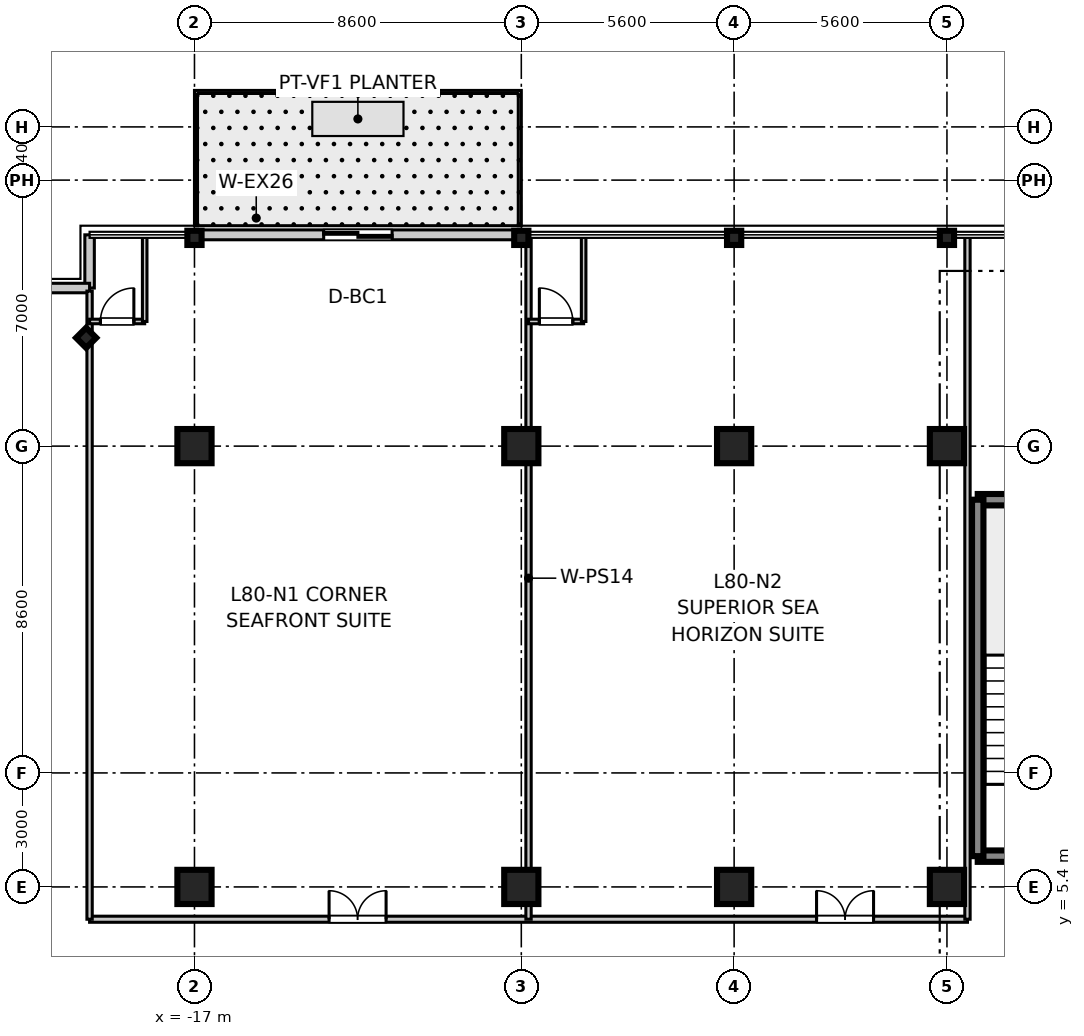
"""IFC4 building model, lengths in metres.
Left out: names, types, materials, properties, quantities, classifications, styles, units other than length and angle.
Written with IfcOpenShell. Run it as: python <this file> out.ifc"""

import sys

from ifc_helpers import new_model, si_unit, direction, frame, frame_2d, origin, origin_2d, place, context, subcontext, project, spatial, rectangle, i_section, extrude, source, transform, mapped, element, fill, save


model = new_model("IFC4")
c1 = context("Model", 3, precision=1e-05, world=origin(), true_north=direction((0.0, 1.0)))
c2 = subcontext(c1, "Body", "Model", "MODEL_VIEW")
j1 = project(units=[si_unit("LENGTHUNIT", "METRE"), si_unit("PLANEANGLEUNIT", "RADIAN")], contexts=[c1])
p1 = place(None, origin())
s1 = spatial("IfcSite", under=j1, at=p1, CompositionType="ELEMENT")
p2 = place(p1, origin())
s2 = spatial("IfcBuilding", under=s1, at=p2, CompositionType="ELEMENT")
p3 = place(p2, frame((0.0, 0.0, 311.9)))
s3 = spatial("IfcBuildingStorey", under=s2, at=p3, CompositionType="ELEMENT", Elevation=311.9)
m1 = source(origin(), c2, "Body", "SweptSolid", [
    extrude(rectangle(XDim=0.9, YDim=0.9, at=origin_2d()), origin(), (0.0, 0.0, 1.0), 3.805),
])
for number, where, z_axis, x_axis in (
    (1, (-17.0, 5.4, 0.0), (0.0, 0.0, 1.0), (1.0, 0.0, 0.0)),
    (2, (-17.0, 17.0, 0.0), (0.0, 0.0, 1.0), (1.0, 0.0, 0.0)),
    (3, (-8.4, 5.4, 0.0), (0.0, 0.0, 1.0), (1.0, 0.0, 0.0)),
    (4, (-8.4, 17.0, 0.0), (0.0, 0.0, 1.0), (1.0, 0.0, 0.0)),
    (5, (-2.8, 5.4, 0.0), (0.0, 0.0, 1.0), (1.0, 0.0, 0.0)),
    (6, (-2.8, 17.0, 0.0), (0.0, 0.0, 1.0), (1.0, 0.0, 0.0)),
    (7, (2.8, 5.4, 0.0), (0.0, 0.0, 1.0), (1.0, 0.0, 0.0)),
    (8, (2.8, 17.0, 0.0), (0.0, 0.0, 1.0), (1.0, 0.0, 0.0)),
):
    element("IfcColumn", number, at=place(p3, frame(where, z_axis=z_axis, x_axis=x_axis)), inside=s3, PredefinedType="COLUMN", context=c2, shape_type="MappedRepresentation", body=[
        mapped(m1, transform((0.0, 0.0, 0.0), scale=1.0)),
    ])
m2 = source(origin(), c2, "Body", "SweptSolid", [
    extrude(i_section(OverallWidth=0.374, OverallDepth=0.374, WebThickness=0.014, FlangeThickness=0.023, at=origin_2d()), origin(), (0.0, 0.0, 1.0), 3.805),
])
for number, where, z_axis, x_axis in (
    (9, (-17.0, 22.48, 0.0), (0.0, 0.0, 1.0), (0.0, 1.0, 0.0)),
    (10, (-8.4, 22.48, 0.0), (0.0, 0.0, 1.0), (0.0, 1.0, 0.0)),
    (11, (-2.8, 22.48, 0.0), (0.0, 0.0, 1.0), (0.0, 1.0, 0.0)),
    (12, (2.8, 22.48, 0.0), (0.0, 0.0, 1.0), (0.0, 1.0, 0.0)),
    (13, (-19.85, 19.85, 0.0), (0.0, 0.0, 1.0), (0.707, 0.707, 0.0)),
):
    element("IfcColumn", number, at=place(p3, frame(where, z_axis=z_axis, x_axis=x_axis)), inside=s3, PredefinedType="COLUMN", context=c2, shape_type="MappedRepresentation", body=[
        mapped(m2, transform((0.0, 0.0, 0.0), scale=1.0)),
    ])
m3 = source(origin(), c2, "Body", "SweptSolid", [
    extrude(rectangle(XDim=3.98, YDim=0.3, at=frame_2d((1.99, 0.0))), origin(), (0.0, 0.0, 1.0), 3.55),
])
for number, where, z_axis, x_axis in (
    (14, (3.61, 6.21, 0.0), (0.0, 0.0, 1.0), (1.0, 0.0, 0.0)),
    (15, (3.61, 15.59, 0.0), (0.0, 0.0, 1.0), (1.0, 0.0, 0.0)),
):
    element("IfcWall", number, at=place(p3, frame(where, z_axis=z_axis, x_axis=x_axis)), inside=s3, PredefinedType="SHEAR", context=c2, shape_type="MappedRepresentation", body=[
        mapped(m3, transform((0.0, 0.0, 0.0), scale=1.0)),
    ])
m4 = source(origin(), c2, "Body", "SweptSolid", [
    extrude(rectangle(XDim=9.38, YDim=0.3, at=frame_2d((4.69, 0.0))), origin(), (0.0, 0.0, 1.0), 3.55),
])
p4 = place(p3, frame((3.61, 6.21, 0.0), z_axis=(0.0, 0.0, 1.0), x_axis=(0.0, 1.0, 0.0)))
e16 = element("IfcWall", 16, at=p4, inside=s3, PredefinedType="SHEAR", context=c2, shape_type="MappedRepresentation", body=[
    mapped(m4, transform((0.0, 0.0, 0.0), scale=1.0)),
])
m5 = source(origin(), c2, "Body", "SweptSolid", [
    extrude(rectangle(XDim=1.4, YDim=0.25, at=frame_2d((0.7, 0.0))), origin(), (0.0, 0.0, 1.0), 3.55),
])
p5 = place(p3, frame((-19.76, 21.16, 0.0), z_axis=(0.0, 0.0, 1.0), x_axis=(0.0, 1.0, 0.0)))
e17 = element("IfcWall", 17, at=p5, inside=s3, PredefinedType="STANDARD", context=c2, shape_type="MappedRepresentation", body=[
    mapped(m5, transform((0.0, 0.0, 0.0), scale=1.0)),
])
m6 = source(origin(), c2, "Body", "SweptSolid", [
    extrude(rectangle(XDim=1.4, YDim=0.25, at=frame_2d((0.7, 0.0))), origin(), (0.0, 0.0, 1.0), 3.55),
])
p6 = place(p3, frame((-21.16, 21.16, 0.0), z_axis=(0.0, 0.0, 1.0), x_axis=(1.0, 0.0, 0.0)))
e18 = element("IfcWall", 18, at=p6, inside=s3, PredefinedType="STANDARD", context=c2, shape_type="MappedRepresentation", body=[
    mapped(m6, transform((0.0, 0.0, 0.0), scale=1.0)),
])
m7 = source(origin(), c2, "Body", "SweptSolid", [
    extrude(rectangle(XDim=8.6, YDim=0.26, at=frame_2d((4.3, 0.0))), origin(), (0.0, 0.0, 1.0), 3.03),
])
p7 = place(p3, frame((-17.0, 22.56, 0.0), z_axis=(0.0, 0.0, 1.0), x_axis=(1.0, 0.0, 0.0)))
e19 = element("IfcWall", 19, at=p7, inside=s3, PredefinedType="STANDARD", context=c2, shape_type="MappedRepresentation", body=[
    mapped(m7, transform((0.0, 0.0, 0.0), scale=1.0)),
])
p8 = place(p7, frame((3.4, 0.0, 0.0)))
e20 = element("IfcOpeningElement", 20, at=p8, cuts=e19, PredefinedType="OPENING", context=c2, shape_type="SweptSolid", body=[
    extrude(rectangle(XDim=1.8, YDim=2.25, at=frame_2d((0.9, 1.125))), frame((0.0, 0.14, 0.0), z_axis=(0.0, -1.0, 0.0), x_axis=(1.0, 0.0, 0.0)), (0.0, 0.0, 1.0), 0.28),
])
m8 = source(origin(), c2, "Body", "SweptSolid", [
    extrude(rectangle(XDim=23.1, YDim=0.16, at=frame_2d((11.55, 0.0))), origin(), (0.0, 0.0, 1.0), 2.89),
])
p9 = place(p3, frame((-19.76, 4.55, 0.0), z_axis=(0.0, 0.0, 1.0), x_axis=(1.0, 0.0, 0.0)))
e21 = element("IfcWall", 21, at=p9, inside=s3, PredefinedType="PARTITIONING", context=c2, shape_type="MappedRepresentation", body=[
    mapped(m8, transform((0.0, 0.0, 0.0), scale=1.0)),
])
p10 = place(p9, frame((6.302, 0.0, 0.0)))
e22 = element("IfcOpeningElement", 22, at=p10, cuts=e21, PredefinedType="OPENING", context=c2, shape_type="SweptSolid", body=[
    extrude(rectangle(XDim=1.5, YDim=2.15, at=frame_2d((0.75, 1.075))), frame((0.0, 0.09, 0.0), z_axis=(0.0, -1.0, 0.0), x_axis=(1.0, 0.0, 0.0)), (0.0, 0.0, 1.0), 0.18),
])
p11 = place(p9, frame((19.129, 0.0, 0.0)))
e23 = element("IfcOpeningElement", 23, at=p11, cuts=e21, PredefinedType="OPENING", context=c2, shape_type="SweptSolid", body=[
    extrude(rectangle(XDim=1.5, YDim=2.15, at=frame_2d((0.75, 1.075))), frame((0.0, 0.09, 0.0), z_axis=(0.0, -1.0, 0.0), x_axis=(1.0, 0.0, 0.0)), (0.0, 0.0, 1.0), 0.18),
])
m9 = source(origin(), c2, "Body", "SweptSolid", [
    extrude(rectangle(XDim=16.53, YDim=0.14, at=frame_2d((8.265, 0.0))), origin(), (0.0, 0.0, 1.0), 2.89),
])
p12 = place(p3, frame((-19.76, 4.55, 0.0), z_axis=(0.0, 0.0, 1.0), x_axis=(0.0, 1.0, 0.0)))
e24 = element("IfcWall", 24, at=p12, inside=s3, PredefinedType="PARTITIONING", context=c2, shape_type="MappedRepresentation", body=[
    mapped(m9, transform((0.0, 0.0, 0.0), scale=1.0)),
])
m10 = source(origin(), c2, "Body", "SweptSolid", [
    extrude(rectangle(XDim=17.95, YDim=0.14, at=frame_2d((8.975, 0.0))), origin(), (0.0, 0.0, 1.0), 2.89),
])
p13 = place(p3, frame((3.34, 4.55, 0.0), z_axis=(0.0, 0.0, 1.0), x_axis=(0.0, 1.0, 0.0)))
e25 = element("IfcWall", 25, at=p13, inside=s3, PredefinedType="PARTITIONING", context=c2, shape_type="MappedRepresentation", body=[
    mapped(m10, transform((0.0, 0.0, 0.0), scale=1.0)),
])
m11 = source(origin(), c2, "Body", "SweptSolid", [
    extrude(rectangle(XDim=1.45, YDim=0.12, at=frame_2d((0.725, 0.0))), origin(), (0.0, 0.0, 1.0), 2.89),
])
p14 = place(p3, frame((-19.76, 20.28, 0.0), z_axis=(0.0, 0.0, 1.0), x_axis=(1.0, 0.0, 0.0)))
e26 = element("IfcWall", 26, at=p14, inside=s3, PredefinedType="PARTITIONING", context=c2, shape_type="MappedRepresentation", body=[
    mapped(m11, transform((0.0, 0.0, 0.0), scale=1.0)),
])
p15 = place(p14, frame((0.285, 0.0, 0.0)))
e27 = element("IfcOpeningElement", 27, at=p15, cuts=e26, PredefinedType="OPENING", context=c2, shape_type="SweptSolid", body=[
    extrude(rectangle(XDim=0.88, YDim=2.1, at=frame_2d((0.44, 1.05))), frame((0.0, 0.07, 0.0), z_axis=(0.0, -1.0, 0.0), x_axis=(1.0, 0.0, 0.0)), (0.0, 0.0, 1.0), 0.14),
])
m12 = source(origin(), c2, "Body", "SweptSolid", [
    extrude(rectangle(XDim=2.22, YDim=0.12, at=frame_2d((1.11, 0.0))), origin(), (0.0, 0.0, 1.0), 2.89),
])
p16 = place(p3, frame((-18.31, 20.28, 0.0), z_axis=(0.0, 0.0, 1.0), x_axis=(0.0, 1.0, 0.0)))
e28 = element("IfcWall", 28, at=p16, inside=s3, PredefinedType="PARTITIONING", context=c2, shape_type="MappedRepresentation", body=[
    mapped(m12, transform((0.0, 0.0, 0.0), scale=1.0)),
])
p17 = place(p3, frame((-8.21, 4.55, 0.0), z_axis=(0.0, 0.0, 1.0), x_axis=(0.0, 1.0, 0.0)))
e29 = element("IfcWall", 29, at=p17, inside=s3, PredefinedType="PARTITIONING", context=c2, shape_type="MappedRepresentation", body=[
    mapped(m10, transform((0.0, 0.0, 0.0), scale=1.0)),
])
p18 = place(p3, frame((-8.21, 20.28, 0.0), z_axis=(0.0, 0.0, 1.0), x_axis=(1.0, 0.0, 0.0)))
e30 = element("IfcWall", 30, at=p18, inside=s3, PredefinedType="PARTITIONING", context=c2, shape_type="MappedRepresentation", body=[
    mapped(m11, transform((0.0, 0.0, 0.0), scale=1.0)),
])
p19 = place(p18, frame((0.285, 0.0, 0.0)))
e31 = element("IfcOpeningElement", 31, at=p19, cuts=e30, PredefinedType="OPENING", context=c2, shape_type="SweptSolid", body=[
    extrude(rectangle(XDim=0.88, YDim=2.1, at=frame_2d((0.44, 1.05))), frame((0.0, 0.07, 0.0), z_axis=(0.0, -1.0, 0.0), x_axis=(1.0, 0.0, 0.0)), (0.0, 0.0, 1.0), 0.14),
])
p20 = place(p3, frame((-6.76, 20.28, 0.0), z_axis=(0.0, 0.0, 1.0), x_axis=(0.0, 1.0, 0.0)))
e32 = element("IfcWall", 32, at=p20, inside=s3, PredefinedType="PARTITIONING", context=c2, shape_type="MappedRepresentation", body=[
    mapped(m12, transform((0.0, 0.0, 0.0), scale=1.0)),
])
m13 = source(origin(), c2, "Body", "SweptSolid", [
    extrude(rectangle(XDim=0.88, YDim=2.1, at=frame_2d((0.44, 1.05))), frame((0.0, 0.025, 0.0), z_axis=(0.0, -1.0, 0.0), x_axis=(1.0, 0.0, 0.0)), (0.0, 0.0, 1.0), 0.05),
])
p21 = place(p15, origin())
e33 = element("IfcDoor", 33, at=p21, inside=s3, OperationType="SINGLE_SWING_RIGHT", PredefinedType="DOOR", context=c2, shape_type="MappedRepresentation", body=[
    mapped(m13, transform((0.0, 0.0, 0.0), scale=1.0)),
])
fill(e27, e33)
m14 = source(origin(), c2, "Body", "SweptSolid", [
    extrude(rectangle(XDim=1.5, YDim=2.15, at=frame_2d((0.75, 1.075))), frame((0.0, 0.025, 0.0), z_axis=(0.0, -1.0, 0.0), x_axis=(1.0, 0.0, 0.0)), (0.0, 0.0, 1.0), 0.05),
])
p22 = place(p10, origin())
e34 = element("IfcDoor", 34, at=p22, inside=s3, OperationType="DOUBLE_DOOR_SINGLE_SWING", PredefinedType="DOOR", context=c2, shape_type="MappedRepresentation", body=[
    mapped(m14, transform((0.0, 0.0, 0.0), scale=1.0)),
])
fill(e22, e34)
p23 = place(p19, origin())
e35 = element("IfcDoor", 35, at=p23, inside=s3, OperationType="SINGLE_SWING_LEFT", PredefinedType="DOOR", context=c2, shape_type="MappedRepresentation", body=[
    mapped(m13, transform((0.0, 0.0, 0.0), scale=1.0)),
])
fill(e31, e35)
p24 = place(p11, origin())
e36 = element("IfcDoor", 36, at=p24, inside=s3, OperationType="DOUBLE_DOOR_SINGLE_SWING", PredefinedType="DOOR", context=c2, shape_type="MappedRepresentation", body=[
    mapped(m14, transform((0.0, 0.0, 0.0), scale=1.0)),
])
fill(e23, e36)
m15 = source(origin(), c2, "Body", "SweptSolid", [
    extrude(rectangle(XDim=1.8, YDim=2.25, at=frame_2d((0.9, 1.125))), frame((0.0, 0.025, 0.0), z_axis=(0.0, -1.0, 0.0), x_axis=(1.0, 0.0, 0.0)), (0.0, 0.0, 1.0), 0.05),
])
p25 = place(p8, origin())
e37 = element("IfcDoor", 37, at=p25, inside=s3, OperationType="DOUBLE_DOOR_SLIDING", PredefinedType="DOOR", context=c2, shape_type="MappedRepresentation", body=[
    mapped(m15, transform((0.0, 0.0, 0.0), scale=1.0)),
])
fill(e20, e37)
save(model, sys.argv[1])
